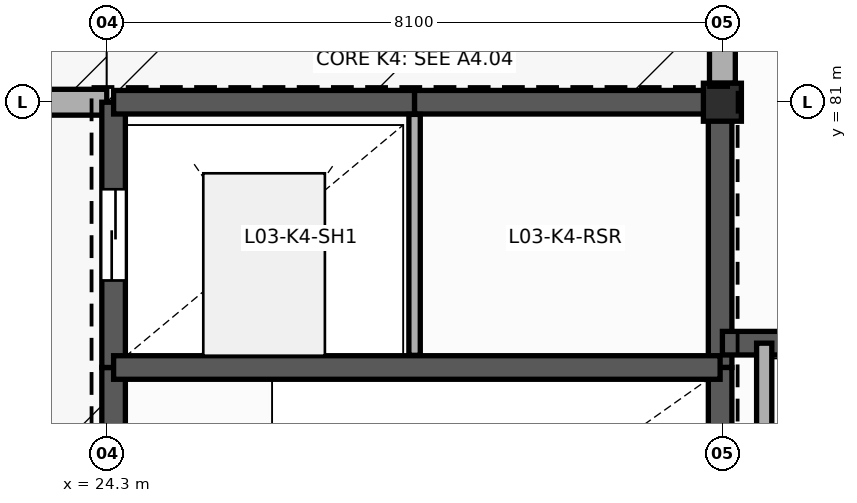
"""IFC4 building model, lengths in metres.
Left out: names, types, materials, properties, quantities, classifications, styles, units other than length and angle.
Written with IfcOpenShell. Run it as: python <this file> out.ifc"""

import sys

from ifc_helpers import new_model, si_unit, direction, frame, frame_2d, origin, origin_2d, place, context, subcontext, project, spatial, rectangle, extrude, element, fill, save


model = new_model("IFC4")
c1 = context("Model", 3, precision=1e-05, world=origin(), true_north=direction((0.0, 1.0)))
c2 = subcontext(c1, "Body", "Model", "MODEL_VIEW")
j1 = project(units=[si_unit("LENGTHUNIT", "METRE"), si_unit("PLANEANGLEUNIT", "RADIAN")], contexts=[c1])
p1 = place(None, origin())
s1 = spatial("IfcSite", under=j1, at=p1, CompositionType="ELEMENT")
p2 = place(p1, origin())
s2 = spatial("IfcBuilding", under=s1, at=p2, CompositionType="ELEMENT")
p3 = place(p2, frame((0.0, 0.0, 15.0)))
s3 = spatial("IfcBuildingStorey", under=s2, at=p3, CompositionType="ELEMENT", Elevation=15.0)
p4 = place(p3, frame((32.4, 81.0, 0.0), z_axis=(0.0, 0.0, 1.0), x_axis=(1.0, 0.0, 0.0)))
e1 = element("IfcColumn", 1, at=p4, inside=s3, PredefinedType="COLUMN", context=c2, shape_type="SweptSolid", body=[
    extrude(rectangle(XDim=0.5, YDim=0.5, at=origin_2d()), origin(), (0.0, 0.0, 1.0), 4.2),
])
p5 = place(p3, frame((32.4, 89.1, 0.0), z_axis=(0.0, 0.0, 1.0), x_axis=(0.0, -1.0, 0.0)))
e2 = element("IfcWall", 2, at=p5, inside=s3, PredefinedType="SOLIDWALL", context=c2, shape_type="SweptSolid", body=[
    extrude(rectangle(XDim=7.85, YDim=0.34, at=frame_2d((3.925, 0.0))), origin(), (0.0, 0.0, 1.0), 3.547),
])
p6 = place(p3, frame((24.3, 81.0, 0.0), z_axis=(0.0, 0.0, 1.0), x_axis=(-1.0, 0.0, 0.0)))
e3 = element("IfcWall", 3, at=p6, inside=s3, PredefinedType="SOLIDWALL", context=c2, shape_type="SweptSolid", body=[
    extrude(rectangle(XDim=2.7, YDim=0.34, at=frame_2d((1.35, 0.0))), origin(), (0.0, 0.0, 1.0), 3.9),
])
p7 = place(p3, frame((24.39, 73.15, 0.0), z_axis=(0.0, 0.0, 1.0), x_axis=(0.0, 1.0, 0.0)))
e4 = element("IfcWall", 4, at=p7, inside=s3, PredefinedType="SHEAR", context=c2, shape_type="SweptSolid", body=[
    extrude(rectangle(XDim=4.36, YDim=0.31, at=frame_2d((2.18, 0.0))), origin(), (0.0, 0.0, 1.0), 4.62),
])
p8 = place(p7, frame((1.35, 0.0, 0.0)))
e5 = element("IfcOpeningElement", 5, at=p8, cuts=e4, PredefinedType="OPENING", context=c2, shape_type="SweptSolid", body=[
    extrude(rectangle(XDim=1.2, YDim=2.25, at=frame_2d((0.6, 1.125))), frame((0.0, 0.165, 0.0), z_axis=(0.0, -1.0, 0.0), x_axis=(1.0, 0.0, 0.0)), (0.0, 0.0, 1.0), 0.33),
])
p9 = place(p3, frame((24.39, 77.51, 0.0), z_axis=(0.0, 0.0, 1.0), x_axis=(0.0, 1.0, 0.0)))
e6 = element("IfcWall", 6, at=p9, inside=s3, PredefinedType="SHEAR", context=c2, shape_type="SweptSolid", body=[
    extrude(rectangle(XDim=3.49, YDim=0.31, at=frame_2d((1.745, 0.0))), origin(), (0.0, 0.0, 1.0), 4.62),
])
p10 = place(p9, frame((1.145, 0.0, 0.0)))
e7 = element("IfcOpeningElement", 7, at=p10, cuts=e6, PredefinedType="OPENING", context=c2, shape_type="SweptSolid", body=[
    extrude(rectangle(XDim=1.2, YDim=2.2, at=frame_2d((0.6, 1.1))), frame((0.0, 0.165, 0.0), z_axis=(0.0, -1.0, 0.0), x_axis=(1.0, 0.0, 0.0)), (0.0, 0.0, 1.0), 0.33),
])
p11 = place(p3, frame((24.39, 81.0, 0.0), z_axis=(0.0, 0.0, 1.0), x_axis=(1.0, 0.0, 0.0)))
e8 = element("IfcWall", 8, at=p11, inside=s3, PredefinedType="SHEAR", context=c2, shape_type="SweptSolid", body=[
    extrude(rectangle(XDim=3.96, YDim=0.31, at=frame_2d((1.98, 0.0))), origin(), (0.0, 0.0, 1.0), 4.62),
])
p12 = place(p3, frame((28.35, 81.0, 0.0), z_axis=(0.0, 0.0, 1.0), x_axis=(1.0, 0.0, 0.0)))
e9 = element("IfcWall", 9, at=p12, inside=s3, PredefinedType="SHEAR", context=c2, shape_type="SweptSolid", body=[
    extrude(rectangle(XDim=4.02, YDim=0.31, at=frame_2d((2.01, 0.0))), origin(), (0.0, 0.0, 1.0), 4.62),
])
p13 = place(p3, frame((32.37, 81.0, 0.0), z_axis=(0.0, 0.0, 1.0), x_axis=(0.0, -1.0, 0.0)))
e10 = element("IfcWall", 10, at=p13, inside=s3, PredefinedType="SHEAR", context=c2, shape_type="SweptSolid", body=[
    extrude(rectangle(XDim=3.49, YDim=0.31, at=frame_2d((1.745, 0.0))), origin(), (0.0, 0.0, 1.0), 4.62),
])
p14 = place(p3, frame((32.37, 77.51, 0.0), z_axis=(0.0, 0.0, 1.0), x_axis=(0.0, -1.0, 0.0)))
e11 = element("IfcWall", 11, at=p14, inside=s3, PredefinedType="SHEAR", context=c2, shape_type="SweptSolid", body=[
    extrude(rectangle(XDim=4.36, YDim=0.31, at=frame_2d((2.18, 0.0))), origin(), (0.0, 0.0, 1.0), 4.62),
])
p15 = place(p3, frame((24.39, 77.51, 0.0), z_axis=(0.0, 0.0, 1.0), x_axis=(1.0, 0.0, 0.0)))
e12 = element("IfcWall", 12, at=p15, inside=s3, PredefinedType="SHEAR", context=c2, shape_type="SweptSolid", body=[
    extrude(rectangle(XDim=7.98, YDim=0.31, at=frame_2d((3.99, 0.0))), origin(), (0.0, 0.0, 1.0), 4.62),
])
p16 = place(p3, frame((28.35, 77.67, 0.0), z_axis=(0.0, 0.0, 1.0), x_axis=(0.0, 1.0, 0.0)))
e13 = element("IfcWall", 13, at=p16, inside=s3, PredefinedType="PLUMBINGWALL", context=c2, shape_type="SweptSolid", body=[
    extrude(rectangle(XDim=3.17, YDim=0.15, at=frame_2d((1.585, 0.0))), origin(), (0.0, 0.0, 1.0), 4.27),
])
p17 = place(p3, frame((41.195, 77.83, 0.0), z_axis=(0.0, 0.0, 1.0), x_axis=(-1.0, 0.0, 0.0)))
e14 = element("IfcWall", 14, at=p17, inside=s3, PredefinedType="SHEAR", context=c2, shape_type="SweptSolid", body=[
    extrude(rectangle(XDim=8.795, YDim=0.31, at=frame_2d((4.397, 0.0))), origin(), (0.0, 0.0, 1.0), 3.85),
])
p18 = place(p3, frame((32.95, 73.35, 0.0), z_axis=(0.0, 0.0, 1.0), x_axis=(0.0, 1.0, 0.0)))
e15 = element("IfcWall", 15, at=p18, inside=s3, PredefinedType="PARTITIONING", context=c2, shape_type="SweptSolid", body=[
    extrude(rectangle(XDim=4.48, YDim=0.2, at=frame_2d((2.24, 0.0))), origin(), (0.0, 0.0, 1.0), 3.5),
])
p19 = place(p18, frame((1.25, 0.0, 0.0)))
e16 = element("IfcOpeningElement", 16, at=p19, cuts=e15, PredefinedType="OPENING", context=c2, shape_type="SweptSolid", body=[
    extrude(rectangle(XDim=1.2, YDim=2.25, at=frame_2d((0.6, 1.125))), frame((0.0, 0.11, 0.0), z_axis=(0.0, -1.0, 0.0), x_axis=(1.0, 0.0, 0.0)), (0.0, 0.0, 1.0), 0.22),
])
p20 = place(p10, origin())
e17 = element("IfcDoor", 17, at=p20, inside=s3, OperationType="SLIDING_TO_LEFT", PredefinedType="DOOR", context=c2, shape_type="SweptSolid", body=[
    extrude(rectangle(XDim=1.2, YDim=2.2, at=frame_2d((0.6, 1.1))), frame((0.0, 0.025, 0.0), z_axis=(0.0, -1.0, 0.0), x_axis=(1.0, 0.0, 0.0)), (0.0, 0.0, 1.0), 0.05),
])
fill(e7, e17)
save(model, sys.argv[1])
